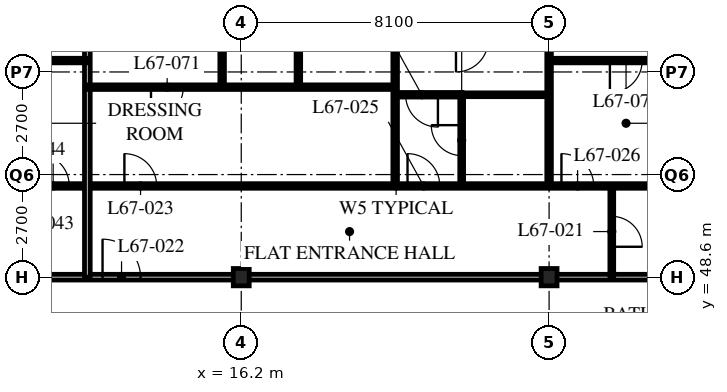
"""IFC4 building model, lengths in metres.
Left out: names, types, materials, properties, quantities, classifications, styles, units other than length and angle.
Written with IfcOpenShell. Run it as: python <this file> out.ifc"""

import sys

from ifc_helpers import new_model, si_unit, direction, frame, frame_2d, origin, origin_2d, place, context, subcontext, project, spatial, rectangle, i_section, extrude, element, fill, save


model = new_model("IFC4")
c1 = context("Model", 3, precision=1e-05, world=origin(), true_north=direction((0.0, 1.0)))
c2 = subcontext(c1, "Body", "Model", "MODEL_VIEW")
j1 = project(units=[si_unit("LENGTHUNIT", "METRE"), si_unit("PLANEANGLEUNIT", "RADIAN")], contexts=[c1])
p1 = place(None, origin())
s1 = spatial("IfcSite", under=j1, at=p1, CompositionType="ELEMENT")
p2 = place(p1, origin())
s2 = spatial("IfcBuilding", under=s1, at=p2, CompositionType="ELEMENT")
p3 = place(p2, frame((0.0, 0.0, 261.9)))
s3 = spatial("IfcBuildingStorey", under=s2, at=p3, CompositionType="ELEMENT", Elevation=261.9)
for number, where, z_axis, x_axis in (
    (1, (16.2, 48.6, 0.0), (0.0, 0.0, 1.0), (1.0, 0.0, 0.0)),
    (2, (24.3, 48.6, 0.0), (0.0, 0.0, 1.0), (1.0, 0.0, 0.0)),
):
    element("IfcColumn", number, at=place(p3, frame(where, z_axis=z_axis, x_axis=x_axis)), inside=s3, PredefinedType="COLUMN", context=c2, shape_type="SweptSolid", body=[
        extrude(i_section(OverallWidth=0.418, OverallDepth=0.456, WebThickness=0.042, FlangeThickness=0.067, FilletRadius=0.015, at=origin_2d()), origin(), (0.0, 0.0, 1.0), 3.9),
    ])
p4 = place(p3, frame((8.1, 48.6, 0.0), z_axis=(0.0, 0.0, 1.0), x_axis=(1.0, 0.0, 0.0)))
e3 = element("IfcWall", 3, at=p4, inside=s3, PredefinedType="PARTITIONING", context=c2, shape_type="SweptSolid", body=[
    extrude(rectangle(XDim=28.35, YDim=0.15, at=frame_2d((14.175, 0.0))), origin(), (0.0, 0.0, 1.0), 3.078),
])
p5 = place(p4, frame((4.45, 0.0, 0.0)))
e4 = element("IfcOpeningElement", 4, at=p5, cuts=e3, PredefinedType="OPENING", context=c2, shape_type="SweptSolid", body=[
    extrude(rectangle(XDim=1.0, YDim=2.1, at=frame_2d((0.5, 1.05))), frame((0.0, 0.085, 0.0), z_axis=(0.0, -1.0, 0.0), x_axis=(1.0, 0.0, 0.0)), (0.0, 0.0, 1.0), 0.17),
])
p6 = place(p4, frame((20.65, 0.0, 0.0)))
e5 = element("IfcOpeningElement", 5, at=p6, cuts=e3, PredefinedType="OPENING", context=c2, shape_type="SweptSolid", body=[
    extrude(rectangle(XDim=1.0, YDim=2.1, at=frame_2d((0.5, 1.05))), frame((0.0, 0.085, 0.0), z_axis=(0.0, -1.0, 0.0), x_axis=(1.0, 0.0, 0.0)), (0.0, 0.0, 1.0), 0.17),
])
p7 = place(p4, frame((1.525, 0.0, 0.0)))
e6 = element("IfcOpeningElement", 6, at=p7, cuts=e3, PredefinedType="OPENING", context=c2, shape_type="SweptSolid", body=[
    extrude(rectangle(XDim=1.0, YDim=2.1, at=frame_2d((0.5, 1.05))), frame((0.0, 0.085, 0.0), z_axis=(0.0, -1.0, 0.0), x_axis=(1.0, 0.0, 0.0)), (0.0, 0.0, 1.0), 0.17),
])
p8 = place(p3, frame((25.95, 48.6, 0.0), z_axis=(0.0, 0.0, 1.0), x_axis=(0.0, 1.0, 0.0)))
e7 = element("IfcWall", 7, at=p8, inside=s3, PredefinedType="PARTITIONING", context=c2, shape_type="SweptSolid", body=[
    extrude(rectangle(XDim=2.4, YDim=0.1, at=frame_2d((1.2, 0.0))), origin(), (0.0, 0.0, 1.0), 3.69),
])
p9 = place(p8, frame((0.8, 0.0, 0.0)))
e8 = element("IfcOpeningElement", 8, at=p9, cuts=e7, PredefinedType="OPENING", context=c2, shape_type="SweptSolid", body=[
    extrude(rectangle(XDim=0.8, YDim=2.1, at=frame_2d((0.4, 1.05))), frame((0.0, 0.06, 0.0), z_axis=(0.0, -1.0, 0.0), x_axis=(1.0, 0.0, 0.0)), (0.0, 0.0, 1.0), 0.12),
])
p10 = place(p3, frame((22.0, 51.0, 0.0), z_axis=(0.0, 0.0, 1.0), x_axis=(0.0, 1.0, 0.0)))
e9 = element("IfcWall", 9, at=p10, inside=s3, PredefinedType="PARTITIONING", context=c2, shape_type="SweptSolid", body=[
    extrude(rectangle(XDim=2.4, YDim=0.1, at=frame_2d((1.2, 0.0))), origin(), (0.0, 0.0, 1.0), 3.69),
])
p11 = place(p10, frame((0.8, 0.0, 0.0)))
e10 = element("IfcOpeningElement", 10, at=p11, cuts=e9, PredefinedType="OPENING", context=c2, shape_type="SweptSolid", body=[
    extrude(rectangle(XDim=0.8, YDim=2.1, at=frame_2d((0.4, 1.05))), frame((0.0, 0.06, 0.0), z_axis=(0.0, -1.0, 0.0), x_axis=(1.0, 0.0, 0.0)), (0.0, 0.0, 1.0), 0.12),
])
p12 = place(p3, frame((22.0, 53.4, 0.0), z_axis=(0.0, 0.0, 1.0), x_axis=(1.0, 0.0, 0.0)))
e11 = element("IfcWall", 11, at=p12, inside=s3, PredefinedType="PARTITIONING", context=c2, shape_type="SweptSolid", body=[
    extrude(rectangle(XDim=2.3, YDim=0.1, at=frame_2d((1.15, 0.0))), origin(), (0.0, 0.0, 1.0), 3.69),
])
p13 = place(p3, frame((20.25, 51.0, 0.0), z_axis=(0.0, 0.0, 1.0), x_axis=(0.0, 1.0, 0.0)))
e12 = element("IfcWall", 12, at=p13, inside=s3, PredefinedType="PARTITIONING", context=c2, shape_type="SweptSolid", body=[
    extrude(rectangle(XDim=13.5, YDim=0.12, at=frame_2d((6.75, 0.0))), origin(), (0.0, 0.0, 1.0), 3.69),
])
p14 = place(p3, frame((24.3, 51.0, 0.0), z_axis=(0.0, 0.0, 1.0), x_axis=(0.0, 1.0, 0.0)))
e13 = element("IfcWall", 13, at=p14, inside=s3, PredefinedType="PARTITIONING", context=c2, shape_type="SweptSolid", body=[
    extrude(rectangle(XDim=13.5, YDim=0.12, at=frame_2d((6.75, 0.0))), origin(), (0.0, 0.0, 1.0), 3.078),
])
p15 = place(p3, frame((4.1, 51.0, 0.0), z_axis=(0.0, 0.0, 1.0), x_axis=(1.0, 0.0, 0.0)))
e14 = element("IfcWall", 14, at=p15, inside=s3, PredefinedType="PARTITIONING", context=c2, shape_type="SweptSolid", body=[
    extrude(rectangle(XDim=32.35, YDim=0.12, at=frame_2d((16.175, 0.0))), origin(), (0.0, 0.0, 1.0), 3.69),
])
p16 = place(p15, frame((9.025, 0.0, 0.0)))
e15 = element("IfcOpeningElement", 15, at=p16, cuts=e14, PredefinedType="OPENING", context=c2, shape_type="SweptSolid", body=[
    extrude(rectangle(XDim=0.85, YDim=2.1, at=frame_2d((0.425, 1.05))), frame((0.0, 0.07, 0.0), z_axis=(0.0, -1.0, 0.0), x_axis=(1.0, 0.0, 0.0)), (0.0, 0.0, 1.0), 0.14),
])
p17 = place(p15, frame((16.475, 0.0, 0.0)))
e16 = element("IfcOpeningElement", 16, at=p17, cuts=e14, PredefinedType="OPENING", context=c2, shape_type="SweptSolid", body=[
    extrude(rectangle(XDim=0.85, YDim=2.1, at=frame_2d((0.425, 1.05))), frame((0.0, 0.07, 0.0), z_axis=(0.0, -1.0, 0.0), x_axis=(1.0, 0.0, 0.0)), (0.0, 0.0, 1.0), 0.14),
])
p18 = place(p15, frame((20.525, 0.0, 0.0)))
e17 = element("IfcOpeningElement", 17, at=p18, cuts=e14, PredefinedType="OPENING", context=c2, shape_type="SweptSolid", body=[
    extrude(rectangle(XDim=0.85, YDim=2.1, at=frame_2d((0.425, 1.05))), frame((0.0, 0.07, 0.0), z_axis=(0.0, -1.0, 0.0), x_axis=(1.0, 0.0, 0.0)), (0.0, 0.0, 1.0), 0.14),
])
p19 = place(p15, frame((25.225, 0.0, 0.0)))
e18 = element("IfcOpeningElement", 18, at=p19, cuts=e14, PredefinedType="OPENING", context=c2, shape_type="SweptSolid", body=[
    extrude(rectangle(XDim=0.85, YDim=2.1, at=frame_2d((0.425, 1.05))), frame((0.0, 0.07, 0.0), z_axis=(0.0, -1.0, 0.0), x_axis=(1.0, 0.0, 0.0)), (0.0, 0.0, 1.0), 0.14),
])
p20 = place(p15, frame((28.625, 0.0, 0.0)))
e19 = element("IfcOpeningElement", 19, at=p20, cuts=e14, PredefinedType="OPENING", context=c2, shape_type="SweptSolid", body=[
    extrude(rectangle(XDim=0.85, YDim=2.1, at=frame_2d((0.425, 1.05))), frame((0.0, 0.07, 0.0), z_axis=(0.0, -1.0, 0.0), x_axis=(1.0, 0.0, 0.0)), (0.0, 0.0, 1.0), 0.14),
])
p21 = place(p15, frame((6.725, 0.0, 0.0)))
e20 = element("IfcOpeningElement", 20, at=p21, cuts=e14, PredefinedType="OPENING", context=c2, shape_type="SweptSolid", body=[
    extrude(rectangle(XDim=0.85, YDim=2.1, at=frame_2d((0.425, 1.05))), frame((0.0, 0.07, 0.0), z_axis=(0.0, -1.0, 0.0), x_axis=(1.0, 0.0, 0.0)), (0.0, 0.0, 1.0), 0.14),
])
p22 = place(p15, frame((2.875, 0.0, 0.0)))
e21 = element("IfcOpeningElement", 21, at=p22, cuts=e14, PredefinedType="OPENING", context=c2, shape_type="SweptSolid", body=[
    extrude(rectangle(XDim=0.85, YDim=2.1, at=frame_2d((0.425, 1.05))), frame((0.0, 0.07, 0.0), z_axis=(0.0, -1.0, 0.0), x_axis=(1.0, 0.0, 0.0)), (0.0, 0.0, 1.0), 0.14),
])
p23 = place(p3, frame((12.15, 48.6, 0.0), z_axis=(0.0, 0.0, 1.0), x_axis=(0.0, 1.0, 0.0)))
e22 = element("IfcWall", 22, at=p23, inside=s3, PredefinedType="PARTITIONING", context=c2, shape_type="SweptSolid", body=[
    extrude(rectangle(XDim=15.9, YDim=0.15, at=frame_2d((7.95, 0.0))), origin(), (0.0, 0.0, 1.0), 3.69),
])
p24 = place(p3, frame((20.25, 53.4, 0.0), z_axis=(0.0, 0.0, 1.0), x_axis=(1.0, 0.0, 0.0)))
e23 = element("IfcWall", 23, at=p24, inside=s3, PredefinedType="PARTITIONING", context=c2, shape_type="SweptSolid", body=[
    extrude(rectangle(XDim=1.76, YDim=0.12, at=frame_2d((0.88, 0.0))), origin(), (0.0, 0.0, 1.0), 3.69),
])
p25 = place(p24, frame((0.275, 0.0, 0.0)))
e24 = element("IfcOpeningElement", 24, at=p25, cuts=e23, PredefinedType="OPENING", context=c2, shape_type="SweptSolid", body=[
    extrude(rectangle(XDim=0.85, YDim=2.1, at=frame_2d((0.425, 1.05))), frame((0.0, 0.07, 0.0), z_axis=(0.0, -1.0, 0.0), x_axis=(1.0, 0.0, 0.0)), (0.0, 0.0, 1.0), 0.14),
])
p26 = place(p3, frame((12.15, 53.6, 0.0), z_axis=(0.0, 0.0, 1.0), x_axis=(1.0, 0.0, 0.0)))
e25 = element("IfcWall", 25, at=p26, inside=s3, PredefinedType="PARTITIONING", context=c2, shape_type="SweptSolid", body=[
    extrude(rectangle(XDim=8.1, YDim=0.12, at=frame_2d((4.05, 0.0))), origin(), (0.0, 0.0, 1.0), 3.69),
])
p27 = place(p26, frame((1.675, 0.0, 0.0)))
e26 = element("IfcOpeningElement", 26, at=p27, cuts=e25, PredefinedType="OPENING", context=c2, shape_type="SweptSolid", body=[
    extrude(rectangle(XDim=0.85, YDim=2.1, at=frame_2d((0.425, 1.05))), frame((0.0, 0.07, 0.0), z_axis=(0.0, -1.0, 0.0), x_axis=(1.0, 0.0, 0.0)), (0.0, 0.0, 1.0), 0.14),
])
p28 = place(p3, frame((24.3, 54.3, 0.0), z_axis=(0.0, 0.0, 1.0), x_axis=(1.0, 0.0, 0.0)))
e27 = element("IfcWall", 27, at=p28, inside=s3, PredefinedType="PARTITIONING", context=c2, shape_type="SweptSolid", body=[
    extrude(rectangle(XDim=4.05, YDim=0.12, at=frame_2d((2.025, 0.0))), origin(), (0.0, 0.0, 1.0), 3.69),
])
p29 = place(p28, frame((1.6, 0.0, 0.0)))
e28 = element("IfcOpeningElement", 28, at=p29, cuts=e27, PredefinedType="OPENING", context=c2, shape_type="SweptSolid", body=[
    extrude(rectangle(XDim=0.85, YDim=2.1, at=frame_2d((0.425, 1.05))), frame((0.0, 0.07, 0.0), z_axis=(0.0, -1.0, 0.0), x_axis=(1.0, 0.0, 0.0)), (0.0, 0.0, 1.0), 0.14),
])
p30 = place(p3, frame((8.1, 54.3, 0.0), z_axis=(0.0, 0.0, 1.0), x_axis=(1.0, 0.0, 0.0)))
e29 = element("IfcWall", 29, at=p30, inside=s3, PredefinedType="PARTITIONING", context=c2, shape_type="SweptSolid", body=[
    extrude(rectangle(XDim=4.05, YDim=0.12, at=frame_2d((2.025, 0.0))), origin(), (0.0, 0.0, 1.0), 3.69),
])
p31 = place(p30, frame((1.6, 0.0, 0.0)))
e30 = element("IfcOpeningElement", 30, at=p31, cuts=e29, PredefinedType="OPENING", context=c2, shape_type="SweptSolid", body=[
    extrude(rectangle(XDim=0.85, YDim=2.1, at=frame_2d((0.425, 1.05))), frame((0.0, 0.07, 0.0), z_axis=(0.0, -1.0, 0.0), x_axis=(1.0, 0.0, 0.0)), (0.0, 0.0, 1.0), 0.14),
])
for number, where, z_axis, x_axis in (
    (31, (15.697, 53.6, 0.0), (0.0, 0.0, 1.0), (0.0, 1.0, 0.0)),
    (32, (17.703, 53.6, 0.0), (0.0, 0.0, 1.0), (0.0, 1.0, 0.0)),
):
    element("IfcWall", number, at=place(p3, frame(where, z_axis=z_axis, x_axis=x_axis)), inside=s3, PredefinedType="PARTITIONING", context=c2, shape_type="SweptSolid", body=[
        extrude(rectangle(XDim=3.363, YDim=0.12, at=frame_2d((1.681, 0.0))), origin(), (0.0, 0.0, 1.0), 3.69),
    ])
p32 = place(p9, origin())
e33 = element("IfcDoor", 33, at=p32, inside=s3, OperationType="SINGLE_SWING_RIGHT", PredefinedType="DOOR", context=c2, shape_type="SweptSolid", body=[
    extrude(rectangle(XDim=0.8, YDim=2.1, at=frame_2d((0.4, 1.05))), frame((0.0, 0.025, 0.0), z_axis=(0.0, -1.0, 0.0), x_axis=(1.0, 0.0, 0.0)), (0.0, 0.0, 1.0), 0.05),
])
fill(e8, e33)
p33 = place(p5, origin())
e34 = element("IfcDoor", 34, at=p33, inside=s3, OperationType="SINGLE_SWING_LEFT", PredefinedType="DOOR", context=c2, shape_type="SweptSolid", body=[
    extrude(rectangle(XDim=1.0, YDim=2.1, at=frame_2d((0.5, 1.05))), frame((0.0, 0.025, 0.0), z_axis=(0.0, -1.0, 0.0), x_axis=(1.0, 0.0, 0.0)), (0.0, 0.0, 1.0), 0.05),
])
fill(e4, e34)
p34 = place(p16, origin())
e35 = element("IfcDoor", 35, at=p34, inside=s3, OperationType="SINGLE_SWING_LEFT", PredefinedType="DOOR", context=c2, shape_type="SweptSolid", body=[
    extrude(rectangle(XDim=0.85, YDim=2.1, at=frame_2d((0.425, 1.05))), frame((0.0, 0.025, 0.0), z_axis=(0.0, -1.0, 0.0), x_axis=(1.0, 0.0, 0.0)), (0.0, 0.0, 1.0), 0.05),
])
fill(e15, e35)
p35 = place(p11, origin())
e36 = element("IfcDoor", 36, at=p35, inside=s3, OperationType="SINGLE_SWING_RIGHT", PredefinedType="DOOR", context=c2, shape_type="SweptSolid", body=[
    extrude(rectangle(XDim=0.8, YDim=2.1, at=frame_2d((0.4, 1.05))), frame((0.0, 0.025, 0.0), z_axis=(0.0, -1.0, 0.0), x_axis=(1.0, 0.0, 0.0)), (0.0, 0.0, 1.0), 0.05),
])
fill(e10, e36)
p36 = place(p17, origin())
e37 = element("IfcDoor", 37, at=p36, inside=s3, OperationType="SINGLE_SWING_LEFT", PredefinedType="DOOR", context=c2, shape_type="SweptSolid", body=[
    extrude(rectangle(XDim=0.85, YDim=2.1, at=frame_2d((0.425, 1.05))), frame((0.0, 0.025, 0.0), z_axis=(0.0, -1.0, 0.0), x_axis=(1.0, 0.0, 0.0)), (0.0, 0.0, 1.0), 0.05),
])
fill(e16, e37)
p37 = place(p18, origin())
e38 = element("IfcDoor", 38, at=p37, inside=s3, OperationType="SINGLE_SWING_LEFT", PredefinedType="DOOR", context=c2, shape_type="SweptSolid", body=[
    extrude(rectangle(XDim=0.85, YDim=2.1, at=frame_2d((0.425, 1.05))), frame((0.0, 0.025, 0.0), z_axis=(0.0, -1.0, 0.0), x_axis=(1.0, 0.0, 0.0)), (0.0, 0.0, 1.0), 0.05),
])
fill(e17, e38)
p38 = place(p21, origin())
e39 = element("IfcDoor", 39, at=p38, inside=s3, OperationType="SINGLE_SWING_LEFT", PredefinedType="DOOR", context=c2, shape_type="SweptSolid", body=[
    extrude(rectangle(XDim=0.85, YDim=2.1, at=frame_2d((0.425, 1.05))), frame((0.0, 0.025, 0.0), z_axis=(0.0, -1.0, 0.0), x_axis=(1.0, 0.0, 0.0)), (0.0, 0.0, 1.0), 0.05),
])
fill(e20, e39)
p39 = place(p25, origin())
e40 = element("IfcDoor", 40, at=p39, inside=s3, OperationType="SINGLE_SWING_LEFT", PredefinedType="DOOR", context=c2, shape_type="SweptSolid", body=[
    extrude(rectangle(XDim=0.85, YDim=2.1, at=frame_2d((0.425, 1.05))), frame((0.0, 0.025, 0.0), z_axis=(0.0, -1.0, 0.0), x_axis=(1.0, 0.0, 0.0)), (0.0, 0.0, 1.0), 0.05),
])
fill(e24, e40)
p40 = place(p27, origin())
e41 = element("IfcDoor", 41, at=p40, inside=s3, OperationType="SINGLE_SWING_RIGHT", PredefinedType="DOOR", context=c2, shape_type="SweptSolid", body=[
    extrude(rectangle(XDim=0.85, YDim=2.1, at=frame_2d((0.425, 1.05))), frame((0.0, 0.025, 0.0), z_axis=(0.0, -1.0, 0.0), x_axis=(1.0, 0.0, 0.0)), (0.0, 0.0, 1.0), 0.05),
])
fill(e26, e41)
p41 = place(p29, origin())
e42 = element("IfcDoor", 42, at=p41, inside=s3, OperationType="SINGLE_SWING_RIGHT", PredefinedType="DOOR", context=c2, shape_type="SweptSolid", body=[
    extrude(rectangle(XDim=0.85, YDim=2.1, at=frame_2d((0.425, 1.05))), frame((0.0, 0.025, 0.0), z_axis=(0.0, -1.0, 0.0), x_axis=(1.0, 0.0, 0.0)), (0.0, 0.0, 1.0), 0.05),
])
fill(e28, e42)
save(model, sys.argv[1])
